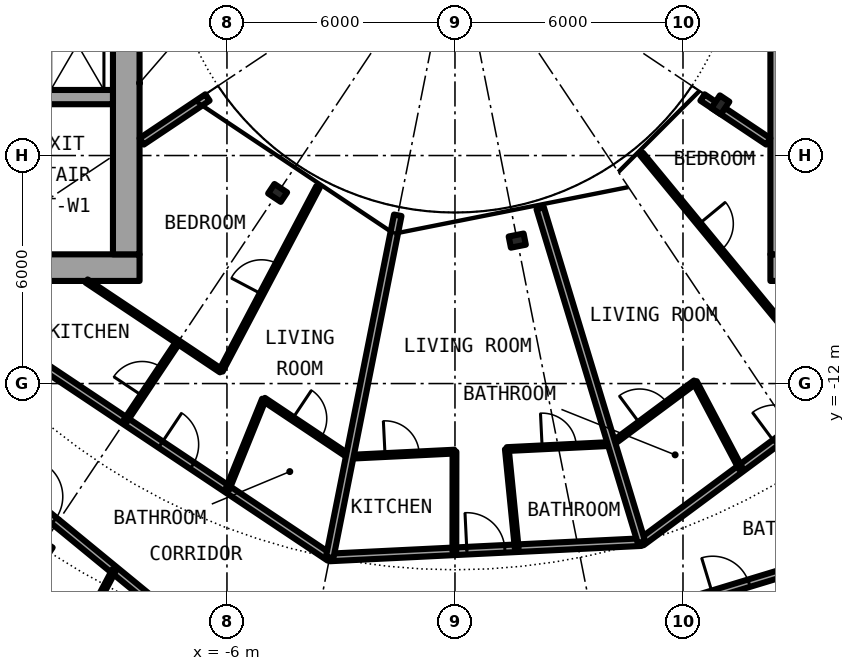
"""IFC4 building model, lengths in metres.
Left out: names, types, materials, properties, quantities, classifications, styles, units other than length and angle.
Written with IfcOpenShell. Run it as: python <this file> out.ifc"""

import sys

from ifc_helpers import new_model, si_unit, direction, frame, frame_2d, origin, origin_2d, place, context, subcontext, project, spatial, rectangle, i_section, extrude, element, fill, save


model = new_model("IFC4")
c1 = context("Model", 3, precision=1e-05, world=origin(), true_north=direction((0.0, 1.0)))
c2 = subcontext(c1, "Body", "Model", "MODEL_VIEW")
j1 = project(units=[si_unit("LENGTHUNIT", "METRE"), si_unit("PLANEANGLEUNIT", "RADIAN")], contexts=[c1])
p1 = place(None, origin())
s1 = spatial("IfcSite", under=j1, at=p1, CompositionType="ELEMENT")
p2 = place(p1, origin())
s2 = spatial("IfcBuilding", under=s1, at=p2, CompositionType="ELEMENT")
p3 = place(p2, frame((0.0, 0.0, 88.0)))
s3 = spatial("IfcBuildingStorey", under=s2, at=p3, CompositionType="ELEMENT", Elevation=88.0)
p4 = place(p3, frame((-10.889, -16.297, 0.0), z_axis=(0.0, 0.0, 1.0), x_axis=(-0.55557023302, -0.831469612303, 0.0)))
e1 = element("IfcColumn", 1, at=p4, inside=s3, PredefinedType="COLUMN", context=c2, shape_type="SweptSolid", body=[
    extrude(i_section(OverallWidth=0.306, OverallDepth=0.524, WebThickness=0.021, FlangeThickness=0.04, FilletRadius=0.027, at=origin_2d()), origin(), (0.0, 0.0, 1.0), 3.05),
])
for number, where, z_axis, x_axis in (
    (2, (-4.667, -6.984, 0.0), (0.0, 0.0, 1.0), (-0.556, -0.831, 0.0)),
    (3, (1.639, -8.239, 0.0), (0.0, 0.0, 1.0), (0.195, -0.981, 0.0)),
    (4, (6.984, -4.667, 0.0), (0.0, 0.0, 1.0), (0.831, -0.556, 0.0)),
):
    element("IfcColumn", number, at=place(p3, frame(where, z_axis=z_axis, x_axis=x_axis)), inside=s3, PredefinedType="COLUMN", context=c2, shape_type="SweptSolid", body=[
        extrude(i_section(OverallWidth=0.3, OverallDepth=0.4, WebThickness=0.013, FlangeThickness=0.024, FilletRadius=0.027, at=origin_2d()), origin(), (0.0, 0.0, 1.0), 3.05),
    ])
p5 = place(p3, frame((8.3, -8.95, 0.0), z_axis=(0.0, 0.0, 1.0), x_axis=(1.0, 0.0, 0.0)))
e5 = element("IfcWall", 5, at=p5, inside=s3, PredefinedType="SHEAR", context=c2, shape_type="SweptSolid", body=[
    extrude(rectangle(XDim=14.0, YDim=0.7, at=frame_2d((7.0, 0.0))), origin(), (0.0, 0.0, 1.0), 3.05),
])
p6 = place(p5, frame((11.575, 0.0, 0.0)))
e6 = element("IfcOpeningElement", 6, at=p6, cuts=e5, PredefinedType="OPENING", context=c2, shape_type="SweptSolid", body=[
    extrude(rectangle(XDim=1.2, YDim=2.3, at=frame_2d((0.6, 1.15))), frame((0.0, 0.36, 0.0), z_axis=(0.0, -1.0, 0.0), x_axis=(1.0, 0.0, 0.0)), (0.0, 0.0, 1.0), 0.72),
])
p7 = place(p3, frame((8.65, -8.6, 0.0), z_axis=(0.0, 0.0, 1.0), x_axis=(0.0, 1.0, 0.0)))
e7 = element("IfcWall", 7, at=p7, inside=s3, PredefinedType="SHEAR", context=c2, shape_type="SweptSolid", body=[
    extrude(rectangle(XDim=17.2, YDim=0.7, at=frame_2d((8.6, 0.0))), origin(), (0.0, 0.0, 1.0), 3.05),
])
p8 = place(p7, frame((7.4, 0.0, 0.1)))
e8 = element("IfcOpeningElement", 8, at=p8, cuts=e7, PredefinedType="OPENING", context=c2, shape_type="SweptSolid", body=[
    extrude(rectangle(XDim=2.4, YDim=2.2, at=frame_2d((1.2, 1.1))), frame((0.0, 0.36, 0.0), z_axis=(0.0, -1.0, 0.0), x_axis=(1.0, 0.0, 0.0)), (0.0, 0.0, 1.0), 0.72),
])
p9 = place(p3, frame((-22.3, -8.95, 0.0), z_axis=(0.0, 0.0, 1.0), x_axis=(1.0, 0.0, 0.0)))
e9 = element("IfcWall", 9, at=p9, inside=s3, PredefinedType="SHEAR", context=c2, shape_type="SweptSolid", body=[
    extrude(rectangle(XDim=14.0, YDim=0.7, at=frame_2d((7.0, 0.0))), origin(), (0.0, 0.0, 1.0), 3.05),
])
p10 = place(p9, frame((1.225, 0.0, 0.0)))
e10 = element("IfcOpeningElement", 10, at=p10, cuts=e9, PredefinedType="OPENING", context=c2, shape_type="SweptSolid", body=[
    extrude(rectangle(XDim=1.2, YDim=2.3, at=frame_2d((0.6, 1.15))), frame((0.0, 0.36, 0.0), z_axis=(0.0, -1.0, 0.0), x_axis=(1.0, 0.0, 0.0)), (0.0, 0.0, 1.0), 0.72),
])
p11 = place(p3, frame((-8.65, 8.6, 0.0), z_axis=(0.0, 0.0, 1.0), x_axis=(0.0, -1.0, 0.0)))
e11 = element("IfcWall", 11, at=p11, inside=s3, PredefinedType="SHEAR", context=c2, shape_type="SweptSolid", body=[
    extrude(rectangle(XDim=17.2, YDim=0.7, at=frame_2d((8.6, 0.0))), origin(), (0.0, 0.0, 1.0), 3.05),
])
p12 = place(p11, frame((7.4, 0.0, 0.1)))
e12 = element("IfcOpeningElement", 12, at=p12, cuts=e11, PredefinedType="OPENING", context=c2, shape_type="SweptSolid", body=[
    extrude(rectangle(XDim=2.4, YDim=2.2, at=frame_2d((1.2, 1.1))), frame((0.0, 0.36, 0.0), z_axis=(0.0, -1.0, 0.0), x_axis=(1.0, 0.0, 0.0)), (0.0, 0.0, 1.0), 0.72),
])
p13 = place(p3, frame((-9.0, -4.462, 0.0), z_axis=(0.0, 0.0, 1.0), x_axis=(-1.0, 0.0, 0.0)))
e13 = element("IfcWall", 13, at=p13, inside=s3, PredefinedType="SHEAR", context=c2, shape_type="SweptSolid", body=[
    extrude(rectangle(XDim=10.15, YDim=0.375, at=frame_2d((5.075, 0.0))), origin(), (0.0, 0.0, 1.0), 3.05),
])
p14 = place(p13, frame((6.6, 0.0, 0.0)))
e14 = element("IfcOpeningElement", 14, at=p14, cuts=e13, PredefinedType="OPENING", context=c2, shape_type="SweptSolid", body=[
    extrude(rectangle(XDim=1.1, YDim=2.3, at=frame_2d((0.55, 1.15))), frame((0.0, 0.198, 0.0), z_axis=(0.0, -1.0, 0.0), x_axis=(1.0, 0.0, 0.0)), (0.0, 0.0, 1.0), 0.395),
])
p15 = place(p3, frame((-16.173, -10.991, 0.0), z_axis=(0.0, 0.0, 1.0), x_axis=(0.773013989296, -0.634388975591, 0.0)))
e15 = element("IfcWall", 15, at=p15, inside=s3, PredefinedType="PARTITIONING", context=c2, shape_type="SweptSolid", body=[
    extrude(rectangle(XDim=11.219, YDim=0.2, at=frame_2d((5.609, 0.0))), origin(), (0.0, 0.0, 1.0), 2.38),
])
p16 = place(p15, frame((6.278, 0.0, 0.0)))
e16 = element("IfcOpeningElement", 16, at=p16, cuts=e15, PredefinedType="OPENING", context=c2, shape_type="SweptSolid", body=[
    extrude(rectangle(XDim=1.0, YDim=2.3, at=frame_2d((0.5, 1.15))), frame((0.0, 0.11, 0.0), z_axis=(0.0, -1.0, 0.0), x_axis=(1.0, 0.0, 0.0)), (0.0, 0.0, 1.0), 0.22),
])
p17 = place(p3, frame((0.0, -19.6, 0.0), z_axis=(0.0, 0.0, 1.0), x_axis=(0.956932298225, 0.290311172044, 0.0)))
e17 = element("IfcWall", 17, at=p17, inside=s3, PredefinedType="PARTITIONING", context=c2, shape_type="SweptSolid", body=[
    extrude(rectangle(XDim=11.219, YDim=0.2, at=frame_2d((5.61, 0.0))), origin(), (0.0, 0.0, 1.0), 2.38),
])
p18 = place(p17, frame((7.086, 0.0, 0.0)))
e18 = element("IfcOpeningElement", 18, at=p18, cuts=e17, PredefinedType="OPENING", context=c2, shape_type="SweptSolid", body=[
    extrude(rectangle(XDim=1.0, YDim=2.3, at=frame_2d((0.5, 1.15))), frame((0.0, 0.11, 0.0), z_axis=(0.0, -1.0, 0.0), x_axis=(1.0, 0.0, 0.0)), (0.0, 0.0, 1.0), 0.22),
])
p19 = place(p3, frame((-3.297, -16.575, 0.0), z_axis=(0.0, 0.0, 1.0), x_axis=(0.998796706656, 0.0490422142, 0.0)))
e19 = element("IfcWall", 19, at=p19, inside=s3, PredefinedType="PARTITIONING", context=c2, shape_type="SweptSolid", body=[
    extrude(rectangle(XDim=8.214, YDim=0.2, at=frame_2d((4.107, 0.0))), origin(), (0.0, 0.0, 1.0), 2.7),
])
p20 = place(p19, frame((3.614, 0.0, 0.0)))
e20 = element("IfcOpeningElement", 20, at=p20, cuts=e19, PredefinedType="OPENING", context=c2, shape_type="SweptSolid", body=[
    extrude(rectangle(XDim=1.0, YDim=2.3, at=frame_2d((0.5, 1.15))), frame((0.0, 0.11, 0.0), z_axis=(0.0, -1.0, 0.0), x_axis=(1.0, 0.0, 0.0)), (0.0, 0.0, 1.0), 0.22),
])
p21 = place(p3, frame((4.906, -16.172, 0.0), z_axis=(0.0, 0.0, 1.0), x_axis=(0.803191461888, 0.595720971219, 0.0)))
e21 = element("IfcWall", 21, at=p21, inside=s3, PredefinedType="PARTITIONING", context=c2, shape_type="SweptSolid", body=[
    extrude(rectangle(XDim=9.76, YDim=0.2, at=frame_2d((4.88, 0.0))), origin(), (0.0, 0.0, 1.0), 2.7),
])
p22 = place(p21, frame((4.38, 0.0, 0.0)))
e22 = element("IfcOpeningElement", 22, at=p22, cuts=e21, PredefinedType="OPENING", context=c2, shape_type="SweptSolid", body=[
    extrude(rectangle(XDim=1.0, YDim=2.3, at=frame_2d((0.5, 1.15))), frame((0.0, 0.11, 0.0), z_axis=(0.0, -1.0, 0.0), x_axis=(1.0, 0.0, 0.0)), (0.0, 0.0, 1.0), 0.22),
])
p23 = place(p3, frame((-12.706, -10.291, 0.0), z_axis=(0.0, 0.0, 1.0), x_axis=(0.831588572532, -0.555392155178, 0.0)))
e23 = element("IfcWall", 23, at=p23, inside=s3, PredefinedType="PARTITIONING", context=c2, shape_type="SweptSolid", body=[
    extrude(rectangle(XDim=11.314, YDim=0.2, at=frame_2d((5.657, 0.0))), origin(), (0.0, 0.0, 1.0), 2.7),
])
p24 = place(p23, frame((5.966, 0.0, 0.0)))
e24 = element("IfcOpeningElement", 24, at=p24, cuts=e23, PredefinedType="OPENING", context=c2, shape_type="SweptSolid", body=[
    extrude(rectangle(XDim=1.0, YDim=2.3, at=frame_2d((0.5, 1.15))), frame((0.0, 0.11, 0.0), z_axis=(0.0, -1.0, 0.0), x_axis=(1.0, 0.0, 0.0)), (0.0, 0.0, 1.0), 0.22),
])
p25 = place(p3, frame((-2.772, -13.927, 0.0), z_axis=(0.0, 0.0, 1.0), x_axis=(0.998787571158, 0.04922791586, 0.0)))
e25 = element("IfcWall", 25, at=p25, inside=s3, PredefinedType="PARTITIONING", context=c2, shape_type="SweptSolid", body=[
    extrude(rectangle(XDim=2.762, YDim=0.1, at=frame_2d((1.381, 0.0))), origin(), (0.0, 0.0, 1.0), 2.7),
])
p26 = place(p25, frame((0.933, 0.0, 0.0)))
e26 = element("IfcOpeningElement", 26, at=p26, cuts=e25, PredefinedType="OPENING", context=c2, shape_type="SweptSolid", body=[
    extrude(rectangle(XDim=0.9, YDim=2.3, at=frame_2d((0.45, 1.15))), frame((0.0, 0.06, 0.0), z_axis=(0.0, -1.0, 0.0), x_axis=(1.0, 0.0, 0.0)), (0.0, 0.0, 1.0), 0.12),
])
p27 = place(p3, frame((1.365, -13.724, 0.0), z_axis=(0.0, 0.0, 1.0), x_axis=(0.99880320044, 0.048909782152, 0.0)))
e27 = element("IfcWall", 27, at=p27, inside=s3, PredefinedType="PARTITIONING", context=c2, shape_type="SweptSolid", body=[
    extrude(rectangle(XDim=2.76, YDim=0.1, at=frame_2d((1.38, 0.0))), origin(), (0.0, 0.0, 1.0), 2.7),
])
p28 = place(p27, frame((0.93, 0.0, 0.0)))
e28 = element("IfcOpeningElement", 28, at=p28, cuts=e27, PredefinedType="OPENING", context=c2, shape_type="SweptSolid", body=[
    extrude(rectangle(XDim=0.9, YDim=2.3, at=frame_2d((0.45, 1.15))), frame((0.0, 0.06, 0.0), z_axis=(0.0, -1.0, 0.0), x_axis=(1.0, 0.0, 0.0)), (0.0, 0.0, 1.0), 0.12),
])
p29 = place(p3, frame((4.123, -13.589, 0.0), z_axis=(0.0, 0.0, 1.0), x_axis=(0.803128348509, 0.595806055542, 0.0)))
e29 = element("IfcWall", 29, at=p29, inside=s3, PredefinedType="PARTITIONING", context=c2, shape_type="SweptSolid", body=[
    extrude(rectangle(XDim=2.734, YDim=0.1, at=frame_2d((1.367, 0.0))), origin(), (0.0, 0.0, 1.0), 2.7),
])
p30 = place(p29, frame((0.916, 0.0, 0.0)))
e30 = element("IfcOpeningElement", 30, at=p30, cuts=e29, PredefinedType="OPENING", context=c2, shape_type="SweptSolid", body=[
    extrude(rectangle(XDim=0.9, YDim=2.3, at=frame_2d((0.45, 1.15))), frame((0.0, 0.06, 0.0), z_axis=(0.0, -1.0, 0.0), x_axis=(1.0, 0.0, 0.0)), (0.0, 0.0, 1.0), 0.12),
])
p31 = place(p3, frame((-9.693, -9.302, 0.0), z_axis=(0.0, 0.0, 1.0), x_axis=(0.831546497949, -0.555455148278, 0.0)))
e31 = element("IfcWall", 31, at=p31, inside=s3, PredefinedType="PARTITIONING", context=c2, shape_type="SweptSolid", body=[
    extrude(rectangle(XDim=4.252, YDim=0.1, at=frame_2d((2.126, 0.0))), origin(), (0.0, 0.0, 1.0), 2.7),
])
p32 = place(p3, frame((-5.029, -12.418, 0.0), z_axis=(0.0, 0.0, 1.0), x_axis=(0.831538390496, -0.555467285384, 0.0)))
e32 = element("IfcWall", 32, at=p32, inside=s3, PredefinedType="PARTITIONING", context=c2, shape_type="SweptSolid", body=[
    extrude(rectangle(XDim=2.717, YDim=0.1, at=frame_2d((1.358, 0.0))), origin(), (0.0, 0.0, 1.0), 2.7),
])
p33 = place(p32, frame((0.908, 0.0, 0.0)))
e33 = element("IfcOpeningElement", 33, at=p33, cuts=e32, PredefinedType="OPENING", context=c2, shape_type="SweptSolid", body=[
    extrude(rectangle(XDim=0.9, YDim=2.3, at=frame_2d((0.45, 1.15))), frame((0.0, 0.06, 0.0), z_axis=(0.0, -1.0, 0.0), x_axis=(1.0, 0.0, 0.0)), (0.0, 0.0, 1.0), 0.12),
])
for number, where, z_axis, x_axis in (
    (34, (-6.513, -4.472, 0.0), (0.0, 0.0, 1.0), (-0.831, -0.556, 0.0)),
    (35, (6.513, -4.472, 0.0), (0.0, 0.0, 1.0), (0.831, -0.556, 0.0)),
):
    element("IfcWall", number, at=place(p3, frame(where, z_axis=z_axis, x_axis=x_axis)), inside=s3, PredefinedType="PARTITIONING", context=c2, shape_type="SweptSolid", body=[
        extrude(rectangle(XDim=2.082, YDim=0.2, at=frame_2d((1.041, 0.0))), origin(), (0.0, 0.0, 1.0), 2.7),
    ])
p34 = place(p3, frame((-10.202, -19.234, 0.0), z_axis=(0.0, 0.0, 1.0), x_axis=(0.468462103808, 0.883483591979, 0.0)))
e36 = element("IfcWall", 36, at=p34, inside=s3, PredefinedType="PARTITIONING", context=c2, shape_type="SweptSolid", body=[
    extrude(rectangle(XDim=2.636, YDim=0.1, at=frame_2d((1.318, 0.0))), origin(), (0.0, 0.0, 1.0), 2.7),
])
p35 = place(p34, frame((0.868, 0.0, 0.0)))
e37 = element("IfcOpeningElement", 37, at=p35, cuts=e36, PredefinedType="OPENING", context=c2, shape_type="SweptSolid", body=[
    extrude(rectangle(XDim=0.9, YDim=2.3, at=frame_2d((0.45, 1.15))), frame((0.0, 0.06, 0.0), z_axis=(0.0, -1.0, 0.0), x_axis=(1.0, 0.0, 0.0)), (0.0, 0.0, 1.0), 0.12),
])
p36 = place(p3, frame((-8.674, -12.982, 0.0), z_axis=(0.0, 0.0, 1.0), x_axis=(0.555355163998, 0.831613276602, 0.0)))
e38 = element("IfcWall", 38, at=p36, inside=s3, PredefinedType="PARTITIONING", context=c2, shape_type="SweptSolid", body=[
    extrude(rectangle(XDim=2.494, YDim=0.1, at=frame_2d((1.247, 0.0))), origin(), (0.0, 0.0, 1.0), 2.7),
])
p37 = place(p36, frame((0.797, 0.0, 0.0)))
e39 = element("IfcOpeningElement", 39, at=p37, cuts=e38, PredefinedType="OPENING", context=c2, shape_type="SweptSolid", body=[
    extrude(rectangle(XDim=0.9, YDim=2.3, at=frame_2d((0.45, 1.15))), frame((0.0, 0.06, 0.0), z_axis=(0.0, -1.0, 0.0), x_axis=(1.0, 0.0, 0.0)), (0.0, 0.0, 1.0), 0.12),
])
p38 = place(p3, frame((-6.158, -11.663, 0.0), z_axis=(0.0, 0.0, 1.0), x_axis=(0.466976820365, 0.884269556889, 0.0)))
e40 = element("IfcWall", 40, at=p38, inside=s3, PredefinedType="PARTITIONING", context=c2, shape_type="SweptSolid", body=[
    extrude(rectangle(XDim=5.469, YDim=0.1, at=frame_2d((2.735, 0.0))), origin(), (0.0, 0.0, 1.0), 2.7),
])
p39 = place(p38, frame((2.284, 0.0, 0.0)))
e41 = element("IfcOpeningElement", 41, at=p39, cuts=e40, PredefinedType="OPENING", context=c2, shape_type="SweptSolid", body=[
    extrude(rectangle(XDim=0.9, YDim=2.3, at=frame_2d((0.45, 1.15))), frame((0.0, 0.06, 0.0), z_axis=(0.0, -1.0, 0.0), x_axis=(1.0, 0.0, 0.0)), (0.0, 0.0, 1.0), 0.12),
])
p40 = place(p3, frame((-5.986, -14.779, 0.0), z_axis=(0.0, 0.0, 1.0), x_axis=(0.375649498413, 0.926761811008, 0.0)))
e42 = element("IfcWall", 42, at=p40, inside=s3, PredefinedType="PARTITIONING", context=c2, shape_type="SweptSolid", body=[
    extrude(rectangle(XDim=2.548, YDim=0.1, at=frame_2d((1.274, 0.0))), origin(), (0.0, 0.0, 1.0), 2.7),
])
p41 = place(p3, frame((-3.297, -16.575, 0.0), z_axis=(0.0, 0.0, 1.0), x_axis=(0.19511354088, 0.980780661598, 0.0)))
e43 = element("IfcWall", 43, at=p41, inside=s3, PredefinedType="PARTITIONING", context=c2, shape_type="SweptSolid", body=[
    extrude(rectangle(XDim=9.179, YDim=0.2, at=frame_2d((4.59, 0.0))), origin(), (0.0, 0.0, 1.0), 2.7),
])
p42 = place(p3, frame((-0.016, -16.414, 0.0), z_axis=(0.0, 0.0, 1.0), x_axis=(0.001210427419, 0.999999267432, 0.0)))
e44 = element("IfcWall", 44, at=p42, inside=s3, PredefinedType="PARTITIONING", context=c2, shape_type="SweptSolid", body=[
    extrude(rectangle(XDim=2.622, YDim=0.1, at=frame_2d((1.311, 0.0))), origin(), (0.0, 0.0, 1.0), 2.7),
])
p43 = place(p3, frame((1.365, -13.724, 0.0), z_axis=(0.0, 0.0, 1.0), x_axis=(0.099171803948, -0.995070325807, 0.0)))
e45 = element("IfcWall", 45, at=p43, inside=s3, PredefinedType="PARTITIONING", context=c2, shape_type="SweptSolid", body=[
    extrude(rectangle(XDim=2.622, YDim=0.1, at=frame_2d((1.311, 0.0))), origin(), (0.0, 0.0, 1.0), 2.7),
])
p44 = place(p3, frame((2.242, -7.388, 0.0), z_axis=(0.0, 0.0, 1.0), x_axis=(0.290225889812, -0.956958166736, 0.0)))
e46 = element("IfcWall", 46, at=p44, inside=s3, PredefinedType="PARTITIONING", context=c2, shape_type="SweptSolid", body=[
    extrude(rectangle(XDim=9.179, YDim=0.2, at=frame_2d((4.59, 0.0))), origin(), (0.0, 0.0, 1.0), 2.7),
])
p45 = place(p3, frame((4.908, -5.959, 0.0), z_axis=(0.0, 0.0, 1.0), x_axis=(0.636105207978, -0.771602335652, 0.0)))
e47 = element("IfcWall", 47, at=p45, inside=s3, PredefinedType="PARTITIONING", context=c2, shape_type="SweptSolid", body=[
    extrude(rectangle(XDim=8.213, YDim=0.1, at=frame_2d((4.106, 0.0))), origin(), (0.0, 0.0, 1.0), 2.7),
])
p46 = place(p45, frame((6.49, 0.0, 0.0)))
e48 = element("IfcOpeningElement", 48, at=p46, cuts=e47, PredefinedType="OPENING", context=c2, shape_type="SweptSolid", body=[
    extrude(rectangle(XDim=0.9, YDim=2.3, at=frame_2d((0.45, 1.15))), frame((0.0, 0.06, 0.0), z_axis=(0.0, -1.0, 0.0), x_axis=(1.0, 0.0, 0.0)), (0.0, 0.0, 1.0), 0.12),
])
p47 = place(p45, frame((2.384, 0.0, 0.0)))
e49 = element("IfcOpeningElement", 49, at=p47, cuts=e47, PredefinedType="OPENING", context=c2, shape_type="SweptSolid", body=[
    extrude(rectangle(XDim=0.9, YDim=2.3, at=frame_2d((0.45, 1.15))), frame((0.0, 0.06, 0.0), z_axis=(0.0, -1.0, 0.0), x_axis=(1.0, 0.0, 0.0)), (0.0, 0.0, 1.0), 0.12),
])
p48 = place(p3, frame((6.317, -11.96, 0.0), z_axis=(0.0, 0.0, 1.0), x_axis=(0.466880254022, -0.884320546185, 0.0)))
e50 = element("IfcWall", 50, at=p48, inside=s3, PredefinedType="PARTITIONING", context=c2, shape_type="SweptSolid", body=[
    extrude(rectangle(XDim=2.573, YDim=0.1, at=frame_2d((1.286, 0.0))), origin(), (0.0, 0.0, 1.0), 2.7),
])
p49 = place(p16, origin())
e51 = element("IfcDoor", 51, at=p49, inside=s3, OperationType="SINGLE_SWING_RIGHT", PredefinedType="DOOR", context=c2, shape_type="SweptSolid", body=[
    extrude(rectangle(XDim=1.0, YDim=2.3, at=frame_2d((0.5, 1.15))), frame((0.0, 0.025, 0.0), z_axis=(0.0, -1.0, 0.0), x_axis=(1.0, 0.0, 0.0)), (0.0, 0.0, 1.0), 0.05),
])
fill(e16, e51)
p50 = place(p18, origin())
e52 = element("IfcDoor", 52, at=p50, inside=s3, OperationType="SINGLE_SWING_RIGHT", PredefinedType="DOOR", context=c2, shape_type="SweptSolid", body=[
    extrude(rectangle(XDim=1.0, YDim=2.3, at=frame_2d((0.5, 1.15))), frame((0.0, 0.025, 0.0), z_axis=(0.0, -1.0, 0.0), x_axis=(1.0, 0.0, 0.0)), (0.0, 0.0, 1.0), 0.05),
])
fill(e18, e52)
p51 = place(p24, origin())
e53 = element("IfcDoor", 53, at=p51, inside=s3, OperationType="SINGLE_SWING_RIGHT", PredefinedType="DOOR", context=c2, shape_type="SweptSolid", body=[
    extrude(rectangle(XDim=1.0, YDim=2.3, at=frame_2d((0.5, 1.15))), frame((0.0, 0.025, 0.0), z_axis=(0.0, -1.0, 0.0), x_axis=(1.0, 0.0, 0.0)), (0.0, 0.0, 1.0), 0.05),
])
fill(e24, e53)
p52 = place(p33, origin())
e54 = element("IfcDoor", 54, at=p52, inside=s3, OperationType="SINGLE_SWING_LEFT", PredefinedType="DOOR", context=c2, shape_type="SweptSolid", body=[
    extrude(rectangle(XDim=0.9, YDim=2.3, at=frame_2d((0.45, 1.15))), frame((0.0, 0.025, 0.0), z_axis=(0.0, -1.0, 0.0), x_axis=(1.0, 0.0, 0.0)), (0.0, 0.0, 1.0), 0.05),
])
fill(e33, e54)
p53 = place(p37, origin())
e55 = element("IfcDoor", 55, at=p53, inside=s3, OperationType="SINGLE_SWING_RIGHT", PredefinedType="DOOR", context=c2, shape_type="SweptSolid", body=[
    extrude(rectangle(XDim=0.9, YDim=2.3, at=frame_2d((0.45, 1.15))), frame((0.0, 0.025, 0.0), z_axis=(0.0, -1.0, 0.0), x_axis=(1.0, 0.0, 0.0)), (0.0, 0.0, 1.0), 0.05),
])
fill(e39, e55)
p54 = place(p39, origin())
e56 = element("IfcDoor", 56, at=p54, inside=s3, OperationType="SINGLE_SWING_LEFT", PredefinedType="DOOR", context=c2, shape_type="SweptSolid", body=[
    extrude(rectangle(XDim=0.9, YDim=2.3, at=frame_2d((0.45, 1.15))), frame((0.0, 0.025, 0.0), z_axis=(0.0, -1.0, 0.0), x_axis=(1.0, 0.0, 0.0)), (0.0, 0.0, 1.0), 0.05),
])
fill(e41, e56)
p55 = place(p20, origin())
e57 = element("IfcDoor", 57, at=p55, inside=s3, OperationType="SINGLE_SWING_RIGHT", PredefinedType="DOOR", context=c2, shape_type="SweptSolid", body=[
    extrude(rectangle(XDim=1.0, YDim=2.3, at=frame_2d((0.5, 1.15))), frame((0.0, 0.025, 0.0), z_axis=(0.0, -1.0, 0.0), x_axis=(1.0, 0.0, 0.0)), (0.0, 0.0, 1.0), 0.05),
])
fill(e20, e57)
p56 = place(p28, origin())
e58 = element("IfcDoor", 58, at=p56, inside=s3, OperationType="SINGLE_SWING_RIGHT", PredefinedType="DOOR", context=c2, shape_type="SweptSolid", body=[
    extrude(rectangle(XDim=0.9, YDim=2.3, at=frame_2d((0.45, 1.15))), frame((0.0, 0.025, 0.0), z_axis=(0.0, -1.0, 0.0), x_axis=(1.0, 0.0, 0.0)), (0.0, 0.0, 1.0), 0.05),
])
fill(e28, e58)
p57 = place(p26, origin())
e59 = element("IfcDoor", 59, at=p57, inside=s3, OperationType="SINGLE_SWING_RIGHT", PredefinedType="DOOR", context=c2, shape_type="SweptSolid", body=[
    extrude(rectangle(XDim=0.9, YDim=2.3, at=frame_2d((0.45, 1.15))), frame((0.0, 0.025, 0.0), z_axis=(0.0, -1.0, 0.0), x_axis=(1.0, 0.0, 0.0)), (0.0, 0.0, 1.0), 0.05),
])
fill(e26, e59)
p58 = place(p22, origin())
e60 = element("IfcDoor", 60, at=p58, inside=s3, OperationType="SINGLE_SWING_LEFT", PredefinedType="DOOR", context=c2, shape_type="SweptSolid", body=[
    extrude(rectangle(XDim=1.0, YDim=2.3, at=frame_2d((0.5, 1.15))), frame((0.0, 0.025, 0.0), z_axis=(0.0, -1.0, 0.0), x_axis=(1.0, 0.0, 0.0)), (0.0, 0.0, 1.0), 0.05),
])
fill(e22, e60)
p59 = place(p30, origin())
e61 = element("IfcDoor", 61, at=p59, inside=s3, OperationType="SINGLE_SWING_LEFT", PredefinedType="DOOR", context=c2, shape_type="SweptSolid", body=[
    extrude(rectangle(XDim=0.9, YDim=2.3, at=frame_2d((0.45, 1.15))), frame((0.0, 0.025, 0.0), z_axis=(0.0, -1.0, 0.0), x_axis=(1.0, 0.0, 0.0)), (0.0, 0.0, 1.0), 0.05),
])
fill(e30, e61)
p60 = place(p47, origin())
e62 = element("IfcDoor", 62, at=p60, inside=s3, OperationType="SINGLE_SWING_LEFT", PredefinedType="DOOR", context=c2, shape_type="SweptSolid", body=[
    extrude(rectangle(XDim=0.9, YDim=2.3, at=frame_2d((0.45, 1.15))), frame((0.0, 0.025, 0.0), z_axis=(0.0, -1.0, 0.0), x_axis=(1.0, 0.0, 0.0)), (0.0, 0.0, 1.0), 0.05),
])
fill(e49, e62)
save(model, sys.argv[1])
